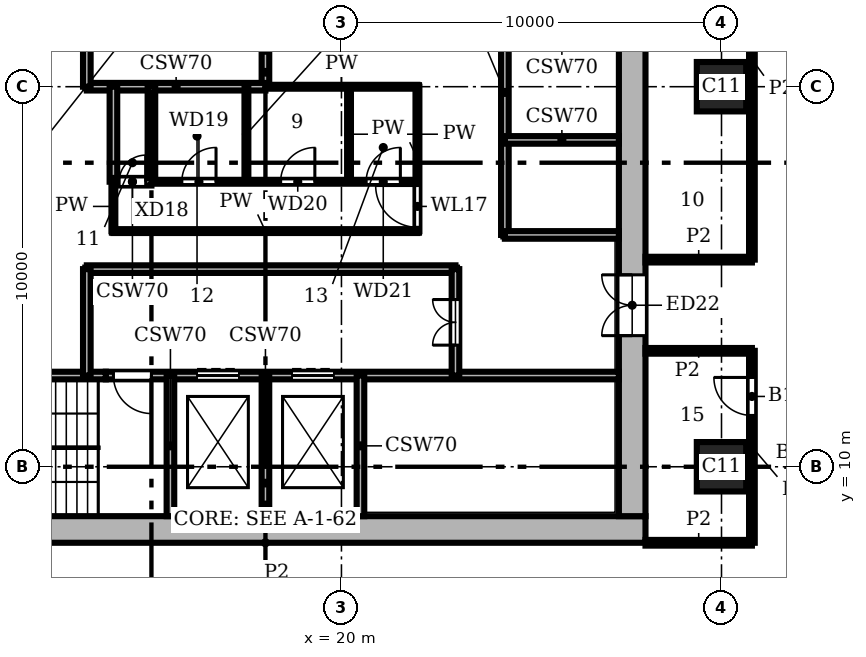
"""IFC4 building model, lengths in metres.
Left out: names, types, materials, properties, quantities, classifications, styles, units other than length and angle.
Written with IfcOpenShell. Run it as: python <this file> out.ifc"""

import sys

from ifc_helpers import new_model, si_unit, direction, frame, frame_2d, origin, origin_2d, place, context, subcontext, project, spatial, rectangle, extrude, element, fill, save


model = new_model("IFC4")
c1 = context("Model", 3, precision=1e-05, world=origin(), true_north=direction((0.0, 1.0)))
c2 = subcontext(c1, "Body", "Model", "MODEL_VIEW")
j1 = project(units=[si_unit("LENGTHUNIT", "METRE"), si_unit("PLANEANGLEUNIT", "RADIAN")], contexts=[c1])
p1 = place(None, origin())
s1 = spatial("IfcSite", under=j1, at=p1, CompositionType="ELEMENT")
p2 = place(p1, origin())
s2 = spatial("IfcBuilding", under=s1, at=p2, CompositionType="ELEMENT")
p3 = place(p2, frame((0.0, 0.0, 131.7)))
s3 = spatial("IfcBuildingStorey", under=s2, at=p3, CompositionType="ELEMENT", Elevation=131.7)
for number, where, z_axis, x_axis in (
    (1, (30.0, 10.0, 0.0), (0.0, 0.0, 1.0), (1.0, 0.0, 0.0)),
    (2, (30.0, 20.0, 0.0), (0.0, 0.0, 1.0), (1.0, 0.0, 0.0)),
):
    element("IfcColumn", number, at=place(p3, frame(where, z_axis=z_axis, x_axis=x_axis)), inside=s3, PredefinedType="COLUMN", context=c2, shape_type="SweptSolid", body=[
        extrude(rectangle(XDim=1.3, YDim=1.3, at=origin_2d()), origin(), (0.0, 0.0, 1.0), 3.9),
    ])
p4 = place(p3, frame((8.0, 8.35, 0.0), z_axis=(0.0, 0.0, 1.0), x_axis=(1.0, 0.0, 0.0)))
e3 = element("IfcWall", 3, at=p4, inside=s3, PredefinedType="SHEAR", context=c2, shape_type="SweptSolid", body=[
    extrude(rectangle(XDim=20.0, YDim=0.7, at=frame_2d((10.0, 0.0))), origin(), (0.0, 0.0, 1.0), 3.9),
])
p5 = place(p3, frame((27.65, 8.7, 0.0), z_axis=(0.0, 0.0, 1.0), x_axis=(0.0, 1.0, 0.0)))
e4 = element("IfcWall", 4, at=p5, inside=s3, PredefinedType="SHEAR", context=c2, shape_type="SweptSolid", body=[
    extrude(rectangle(XDim=18.6, YDim=0.7, at=frame_2d((9.3, 0.0))), origin(), (0.0, 0.0, 1.0), 3.9),
])
p6 = place(p5, frame((4.75, 0.0, 0.0)))
e5 = element("IfcOpeningElement", 5, at=p6, cuts=e4, PredefinedType="OPENING", context=c2, shape_type="SweptSolid", body=[
    extrude(rectangle(XDim=1.6, YDim=2.1, at=frame_2d((0.8, 1.05))), frame((0.0, 0.36, 0.0), z_axis=(0.0, -1.0, 0.0), x_axis=(1.0, 0.0, 0.0)), (0.0, 0.0, 1.0), 0.72),
])
p7 = place(p3, frame((8.7, 12.4, 0.0), z_axis=(0.0, 0.0, 1.0), x_axis=(1.0, 0.0, 0.0)))
e6 = element("IfcWall", 6, at=p7, inside=s3, PredefinedType="SHEAR", context=c2, shape_type="SweptSolid", body=[
    extrude(rectangle(XDim=5.1, YDim=0.2, at=frame_2d((2.55, 0.0))), origin(), (0.0, 0.0, 1.0), 3.58),
])
p8 = place(p3, frame((13.8, 12.4, 0.0), z_axis=(0.0, 0.0, 1.0), x_axis=(1.0, 0.0, 0.0)))
e7 = element("IfcWall", 7, at=p8, inside=s3, PredefinedType="SHEAR", context=c2, shape_type="SweptSolid", body=[
    extrude(rectangle(XDim=13.5, YDim=0.2, at=frame_2d((6.75, 0.0))), origin(), (0.0, 0.0, 1.0), 3.58),
])
p9 = place(p8, frame((2.4, 0.0, 0.0)))
e8 = element("IfcOpeningElement", 8, at=p9, cuts=e7, PredefinedType="OPENING", context=c2, shape_type="SweptSolid", body=[
    extrude(rectangle(XDim=1.1, YDim=2.1, at=frame_2d((0.55, 1.05))), frame((0.0, 0.11, 0.0), z_axis=(0.0, -1.0, 0.0), x_axis=(1.0, 0.0, 0.0)), (0.0, 0.0, 1.0), 0.22),
])
p10 = place(p8, frame((4.9, 0.0, 0.0)))
e9 = element("IfcOpeningElement", 9, at=p10, cuts=e7, PredefinedType="OPENING", context=c2, shape_type="SweptSolid", body=[
    extrude(rectangle(XDim=1.1, YDim=2.1, at=frame_2d((0.55, 1.05))), frame((0.0, 0.11, 0.0), z_axis=(0.0, -1.0, 0.0), x_axis=(1.0, 0.0, 0.0)), (0.0, 0.0, 1.0), 0.22),
])
p11 = place(p8, frame((0.2, 0.0, 0.0)))
e10 = element("IfcOpeningElement", 10, at=p11, cuts=e7, PredefinedType="OPENING", context=c2, shape_type="SweptSolid", body=[
    extrude(rectangle(XDim=1.0, YDim=2.1, at=frame_2d((0.5, 1.05))), frame((0.0, 0.11, 0.0), z_axis=(0.0, -1.0, 0.0), x_axis=(1.0, 0.0, 0.0)), (0.0, 0.0, 1.0), 0.22),
])
p12 = place(p3, frame((13.3, 15.2, 0.0), z_axis=(0.0, 0.0, 1.0), x_axis=(1.0, 0.0, 0.0)))
e11 = element("IfcWall", 11, at=p12, inside=s3, PredefinedType="SHEAR", context=c2, shape_type="SweptSolid", body=[
    extrude(rectangle(XDim=9.7, YDim=0.2, at=frame_2d((4.85, 0.0))), origin(), (0.0, 0.0, 1.0), 3.58),
])
p13 = place(p3, frame((24.3, 16.1, 0.0), z_axis=(0.0, 0.0, 1.0), x_axis=(1.0, 0.0, 0.0)))
e12 = element("IfcWall", 12, at=p13, inside=s3, PredefinedType="SHEAR", context=c2, shape_type="SweptSolid", body=[
    extrude(rectangle(XDim=3.0, YDim=0.2, at=frame_2d((1.5, 0.0))), origin(), (0.0, 0.0, 1.0), 3.58),
])
p14 = place(p3, frame((14.0, 16.2, 0.0), z_axis=(0.0, 0.0, 1.0), x_axis=(1.0, 0.0, 0.0)))
e13 = element("IfcWall", 13, at=p14, inside=s3, PredefinedType="PARTITIONING", context=c2, shape_type="SweptSolid", body=[
    extrude(rectangle(XDim=8.0, YDim=0.1, at=frame_2d((4.0, 0.0))), origin(), (0.0, 0.0, 1.0), 3.58),
])
p15 = place(p3, frame((15.0, 17.5, 0.0), z_axis=(0.0, 0.0, 1.0), x_axis=(1.0, 0.0, 0.0)))
e14 = element("IfcWall", 14, at=p15, inside=s3, PredefinedType="PARTITIONING", context=c2, shape_type="SweptSolid", body=[
    extrude(rectangle(XDim=7.0, YDim=0.1, at=frame_2d((3.5, 0.0))), origin(), (0.0, 0.0, 1.0), 3.58),
])
p16 = place(p15, frame((0.8, 0.0, 0.0)))
e15 = element("IfcOpeningElement", 15, at=p16, cuts=e14, PredefinedType="OPENING", context=c2, shape_type="SweptSolid", body=[
    extrude(rectangle(XDim=0.9, YDim=2.1, at=frame_2d((0.45, 1.05))), frame((0.0, 0.06, 0.0), z_axis=(0.0, -1.0, 0.0), x_axis=(1.0, 0.0, 0.0)), (0.0, 0.0, 1.0), 0.12),
])
p17 = place(p15, frame((3.4, 0.0, 0.0)))
e16 = element("IfcOpeningElement", 16, at=p17, cuts=e14, PredefinedType="OPENING", context=c2, shape_type="SweptSolid", body=[
    extrude(rectangle(XDim=0.9, YDim=2.1, at=frame_2d((0.45, 1.05))), frame((0.0, 0.06, 0.0), z_axis=(0.0, -1.0, 0.0), x_axis=(1.0, 0.0, 0.0)), (0.0, 0.0, 1.0), 0.12),
])
p18 = place(p15, frame((5.65, 0.0, 0.0)))
e17 = element("IfcOpeningElement", 17, at=p18, cuts=e14, PredefinedType="OPENING", context=c2, shape_type="SweptSolid", body=[
    extrude(rectangle(XDim=0.9, YDim=2.1, at=frame_2d((0.45, 1.05))), frame((0.0, 0.06, 0.0), z_axis=(0.0, -1.0, 0.0), x_axis=(1.0, 0.0, 0.0)), (0.0, 0.0, 1.0), 0.12),
])
p19 = place(p3, frame((14.0, 17.5, 0.0), z_axis=(0.0, 0.0, 1.0), x_axis=(1.0, 0.0, 0.0)))
e18 = element("IfcWall", 18, at=p19, inside=s3, PredefinedType="SHEAR", context=c2, shape_type="SweptSolid", body=[
    extrude(rectangle(XDim=1.0, YDim=0.2, at=frame_2d((0.5, 0.0))), origin(), (0.0, 0.0, 1.0), 3.58),
])
p20 = place(p19, frame((0.15, 0.0, 0.0)))
e19 = element("IfcOpeningElement", 19, at=p20, cuts=e18, PredefinedType="OPENING", context=c2, shape_type="SweptSolid", body=[
    extrude(rectangle(XDim=0.7, YDim=2.1, at=frame_2d((0.35, 1.05))), frame((0.0, 0.11, 0.0), z_axis=(0.0, -1.0, 0.0), x_axis=(1.0, 0.0, 0.0)), (0.0, 0.0, 1.0), 0.22),
])
p21 = place(p3, frame((24.3, 18.6, 0.0), z_axis=(0.0, 0.0, 1.0), x_axis=(1.0, 0.0, 0.0)))
e20 = element("IfcWall", 20, at=p21, inside=s3, PredefinedType="SHEAR", context=c2, shape_type="SweptSolid", body=[
    extrude(rectangle(XDim=3.0, YDim=0.2, at=frame_2d((1.5, 0.0))), origin(), (0.0, 0.0, 1.0), 3.58),
])
p22 = place(p3, frame((18.0, 20.0, 0.0), z_axis=(0.0, 0.0, 1.0), x_axis=(1.0, 0.0, 0.0)))
e21 = element("IfcWall", 21, at=p22, inside=s3, PredefinedType="PARTITIONING", context=c2, shape_type="SweptSolid", body=[
    extrude(rectangle(XDim=4.0, YDim=0.1, at=frame_2d((2.0, 0.0))), origin(), (0.0, 0.0, 1.0), 3.58),
])
p23 = place(p3, frame((13.3, 20.0, 0.0), z_axis=(0.0, 0.0, 1.0), x_axis=(1.0, 0.0, 0.0)))
e22 = element("IfcWall", 22, at=p23, inside=s3, PredefinedType="SHEAR", context=c2, shape_type="SweptSolid", body=[
    extrude(rectangle(XDim=4.7, YDim=0.2, at=frame_2d((2.35, 0.0))), origin(), (0.0, 0.0, 1.0), 3.58),
])
p24 = place(p3, frame((13.3, 12.4, 0.0), z_axis=(0.0, 0.0, 1.0), x_axis=(0.0, 1.0, 0.0)))
e23 = element("IfcWall", 23, at=p24, inside=s3, PredefinedType="SHEAR", context=c2, shape_type="SweptSolid", body=[
    extrude(rectangle(XDim=2.8, YDim=0.2, at=frame_2d((1.4, 0.0))), origin(), (0.0, 0.0, 1.0), 3.58),
])
p25 = place(p3, frame((13.3, 20.0, 0.0), z_axis=(0.0, 0.0, 1.0), x_axis=(0.0, 1.0, 0.0)))
e24 = element("IfcWall", 24, at=p25, inside=s3, PredefinedType="SHEAR", context=c2, shape_type="SweptSolid", body=[
    extrude(rectangle(XDim=3.6, YDim=0.2, at=frame_2d((1.8, 0.0))), origin(), (0.0, 0.0, 1.0), 3.58),
])
p26 = place(p3, frame((14.0, 16.2, 0.0), z_axis=(0.0, 0.0, 1.0), x_axis=(0.0, 1.0, 0.0)))
e25 = element("IfcWall", 25, at=p26, inside=s3, PredefinedType="PARTITIONING", context=c2, shape_type="SweptSolid", body=[
    extrude(rectangle(XDim=1.3, YDim=0.1, at=frame_2d((0.65, 0.0))), origin(), (0.0, 0.0, 1.0), 3.58),
])
for number, where, z_axis, x_axis in (
    (26, (14.0, 17.5, 0.0), (0.0, 0.0, 1.0), (0.0, 1.0, 0.0)),
    (27, (15.0, 17.5, 0.0), (0.0, 0.0, 1.0), (0.0, 1.0, 0.0)),
):
    element("IfcWall", number, at=place(p3, frame(where, z_axis=z_axis, x_axis=x_axis)), inside=s3, PredefinedType="SHEAR", context=c2, shape_type="SweptSolid", body=[
        extrude(rectangle(XDim=2.5, YDim=0.2, at=frame_2d((1.25, 0.0))), origin(), (0.0, 0.0, 1.0), 3.58),
    ])
p27 = place(p3, frame((15.5, 8.7, 0.0), z_axis=(0.0, 0.0, 1.0), x_axis=(0.0, 1.0, 0.0)))
e28 = element("IfcWall", 28, at=p27, inside=s3, PredefinedType="SHEAR", context=c2, shape_type="SweptSolid", body=[
    extrude(rectangle(XDim=3.7, YDim=0.2, at=frame_2d((1.85, 0.0))), origin(), (0.0, 0.0, 1.0), 3.58),
])
p28 = place(p3, frame((17.5, 17.5, 0.0), z_axis=(0.0, 0.0, 1.0), x_axis=(0.0, 1.0, 0.0)))
e29 = element("IfcWall", 29, at=p28, inside=s3, PredefinedType="PARTITIONING", context=c2, shape_type="SweptSolid", body=[
    extrude(rectangle(XDim=2.5, YDim=0.1, at=frame_2d((1.25, 0.0))), origin(), (0.0, 0.0, 1.0), 3.58),
])
p29 = place(p3, frame((18.0, 8.7, 0.0), z_axis=(0.0, 0.0, 1.0), x_axis=(0.0, 1.0, 0.0)))
e30 = element("IfcWall", 30, at=p29, inside=s3, PredefinedType="SHEAR", context=c2, shape_type="SweptSolid", body=[
    extrude(rectangle(XDim=3.7, YDim=0.2, at=frame_2d((1.85, 0.0))), origin(), (0.0, 0.0, 1.0), 3.58),
])
p30 = place(p3, frame((18.0, 20.0, 0.0), z_axis=(0.0, 0.0, 1.0), x_axis=(0.0, 1.0, 0.0)))
e31 = element("IfcWall", 31, at=p30, inside=s3, PredefinedType="SHEAR", context=c2, shape_type="SweptSolid", body=[
    extrude(rectangle(XDim=7.3, YDim=0.2, at=frame_2d((3.65, 0.0))), origin(), (0.0, 0.0, 1.0), 3.58),
])
p31 = place(p30, frame((1.2, 0.0, 0.0)))
e32 = element("IfcOpeningElement", 32, at=p31, cuts=e31, PredefinedType="OPENING", context=c2, shape_type="SweptSolid", body=[
    extrude(rectangle(XDim=1.2, YDim=2.1, at=frame_2d((0.6, 1.05))), frame((0.0, 0.11, 0.0), z_axis=(0.0, -1.0, 0.0), x_axis=(1.0, 0.0, 0.0)), (0.0, 0.0, 1.0), 0.22),
])
p32 = place(p3, frame((20.2, 17.5, 0.0), z_axis=(0.0, 0.0, 1.0), x_axis=(0.0, 1.0, 0.0)))
e33 = element("IfcWall", 33, at=p32, inside=s3, PredefinedType="PARTITIONING", context=c2, shape_type="SweptSolid", body=[
    extrude(rectangle(XDim=2.5, YDim=0.1, at=frame_2d((1.25, 0.0))), origin(), (0.0, 0.0, 1.0), 3.58),
])
p33 = place(p3, frame((20.5, 8.7, 0.0), z_axis=(0.0, 0.0, 1.0), x_axis=(0.0, 1.0, 0.0)))
e34 = element("IfcWall", 34, at=p33, inside=s3, PredefinedType="SHEAR", context=c2, shape_type="SweptSolid", body=[
    extrude(rectangle(XDim=3.7, YDim=0.2, at=frame_2d((1.85, 0.0))), origin(), (0.0, 0.0, 1.0), 3.58),
])
p34 = place(p3, frame((22.0, 16.2, 0.0), z_axis=(0.0, 0.0, 1.0), x_axis=(0.0, 1.0, 0.0)))
e35 = element("IfcWall", 35, at=p34, inside=s3, PredefinedType="PARTITIONING", context=c2, shape_type="SweptSolid", body=[
    extrude(rectangle(XDim=3.8, YDim=0.1, at=frame_2d((1.9, 0.0))), origin(), (0.0, 0.0, 1.0), 3.58),
])
p35 = place(p34, frame((0.1, 0.0, 0.0)))
e36 = element("IfcOpeningElement", 36, at=p35, cuts=e35, PredefinedType="OPENING", context=c2, shape_type="SweptSolid", body=[
    extrude(rectangle(XDim=1.1, YDim=2.1, at=frame_2d((0.55, 1.05))), frame((0.0, 0.06, 0.0), z_axis=(0.0, -1.0, 0.0), x_axis=(1.0, 0.0, 0.0)), (0.0, 0.0, 1.0), 0.12),
])
p36 = place(p3, frame((23.0, 12.4, 0.0), z_axis=(0.0, 0.0, 1.0), x_axis=(0.0, 1.0, 0.0)))
e37 = element("IfcWall", 37, at=p36, inside=s3, PredefinedType="SHEAR", context=c2, shape_type="SweptSolid", body=[
    extrude(rectangle(XDim=2.8, YDim=0.2, at=frame_2d((1.4, 0.0))), origin(), (0.0, 0.0, 1.0), 3.58),
])
p37 = place(p36, frame((0.8, 0.0, 0.0)))
e38 = element("IfcOpeningElement", 38, at=p37, cuts=e37, PredefinedType="OPENING", context=c2, shape_type="SweptSolid", body=[
    extrude(rectangle(XDim=1.2, YDim=2.1, at=frame_2d((0.6, 1.05))), frame((0.0, 0.11, 0.0), z_axis=(0.0, -1.0, 0.0), x_axis=(1.0, 0.0, 0.0)), (0.0, 0.0, 1.0), 0.22),
])
p38 = place(p3, frame((24.3, 16.1, 0.0), z_axis=(0.0, 0.0, 1.0), x_axis=(0.0, 1.0, 0.0)))
e39 = element("IfcWall", 39, at=p38, inside=s3, PredefinedType="SHEAR", context=c2, shape_type="SweptSolid", body=[
    extrude(rectangle(XDim=7.5, YDim=0.2, at=frame_2d((3.75, 0.0))), origin(), (0.0, 0.0, 1.0), 3.58),
])
p39 = place(p38, frame((5.7, 0.0, 0.0)))
e40 = element("IfcOpeningElement", 40, at=p39, cuts=e39, PredefinedType="OPENING", context=c2, shape_type="SweptSolid", body=[
    extrude(rectangle(XDim=1.1, YDim=2.1, at=frame_2d((0.55, 1.05))), frame((0.0, 0.11, 0.0), z_axis=(0.0, -1.0, 0.0), x_axis=(1.0, 0.0, 0.0)), (0.0, 0.0, 1.0), 0.22),
])
p40 = place(p3, frame((30.8, 8.0, 0.0), z_axis=(0.0, 0.0, 1.0), x_axis=(0.0, 1.0, 0.0)))
e41 = element("IfcWall", 41, at=p40, inside=s3, PredefinedType="PARTITIONING", context=c2, shape_type="SweptSolid", body=[
    extrude(rectangle(XDim=5.05, YDim=0.15, at=frame_2d((2.525, 0.0))), origin(), (0.0, 0.0, 1.0), 3.58),
])
p41 = place(p40, frame((3.35, 0.0, 0.0)))
e42 = element("IfcOpeningElement", 42, at=p41, cuts=e41, PredefinedType="OPENING", context=c2, shape_type="SweptSolid", body=[
    extrude(rectangle(XDim=1.0, YDim=2.1, at=frame_2d((0.5, 1.05))), frame((0.0, 0.085, 0.0), z_axis=(0.0, -1.0, 0.0), x_axis=(1.0, 0.0, 0.0)), (0.0, 0.0, 1.0), 0.17),
])
p42 = place(p3, frame((30.8, 15.45, 0.0), z_axis=(0.0, 0.0, 1.0), x_axis=(0.0, 1.0, 0.0)))
e43 = element("IfcWall", 43, at=p42, inside=s3, PredefinedType="PARTITIONING", context=c2, shape_type="SweptSolid", body=[
    extrude(rectangle(XDim=10.55, YDim=0.15, at=frame_2d((5.275, 0.0))), origin(), (0.0, 0.0, 1.0), 3.58),
])
p43 = place(p42, frame((5.6, 0.0, 0.0)))
e44 = element("IfcOpeningElement", 44, at=p43, cuts=e43, PredefinedType="OPENING", context=c2, shape_type="SweptSolid", body=[
    extrude(rectangle(XDim=1.0, YDim=2.1, at=frame_2d((0.5, 1.05))), frame((0.0, 0.085, 0.0), z_axis=(0.0, -1.0, 0.0), x_axis=(1.0, 0.0, 0.0)), (0.0, 0.0, 1.0), 0.17),
])
for number, where, z_axis, x_axis in (
    (45, (28.0, 8.0, 0.0), (0.0, 0.0, 1.0), (1.0, 0.0, 0.0)),
    (46, (28.0, 13.05, 0.0), (0.0, 0.0, 1.0), (1.0, 0.0, 0.0)),
    (47, (28.0, 15.45, 0.0), (0.0, 0.0, 1.0), (1.0, 0.0, 0.0)),
):
    element("IfcWall", number, at=place(p3, frame(where, z_axis=z_axis, x_axis=x_axis)), inside=s3, PredefinedType="PARTITIONING", context=c2, shape_type="SweptSolid", body=[
        extrude(rectangle(XDim=2.8, YDim=0.15, at=frame_2d((1.4, 0.0))), origin(), (0.0, 0.0, 1.0), 3.58),
    ])
p44 = place(p9, origin())
e48 = element("IfcDoor", 48, at=p44, inside=s3, OperationType="DOUBLE_DOOR_SLIDING", PredefinedType="DOOR", context=c2, shape_type="SweptSolid", body=[
    extrude(rectangle(XDim=1.1, YDim=2.1, at=frame_2d((0.55, 1.05))), frame((0.0, 0.025, 0.0), z_axis=(0.0, -1.0, 0.0), x_axis=(1.0, 0.0, 0.0)), (0.0, 0.0, 1.0), 0.05),
])
fill(e8, e48)
p45 = place(p10, origin())
e49 = element("IfcDoor", 49, at=p45, inside=s3, OperationType="DOUBLE_DOOR_SLIDING", PredefinedType="DOOR", context=c2, shape_type="SweptSolid", body=[
    extrude(rectangle(XDim=1.1, YDim=2.1, at=frame_2d((0.55, 1.05))), frame((0.0, 0.025, 0.0), z_axis=(0.0, -1.0, 0.0), x_axis=(1.0, 0.0, 0.0)), (0.0, 0.0, 1.0), 0.05),
])
fill(e9, e49)
p46 = place(p11, frame((1.0, 0.0, 0.0), z_axis=(0.0, 0.0, 1.0), x_axis=(-1.0, 0.0, 0.0)))
e50 = element("IfcDoor", 50, at=p46, inside=s3, OperationType="SINGLE_SWING_LEFT", PredefinedType="DOOR", context=c2, shape_type="SweptSolid", body=[
    extrude(rectangle(XDim=1.0, YDim=2.1, at=frame_2d((0.5, 1.05))), frame((0.0, 0.025, 0.0), z_axis=(0.0, -1.0, 0.0), x_axis=(1.0, 0.0, 0.0)), (0.0, 0.0, 1.0), 0.05),
])
fill(e10, e50)
p47 = place(p37, origin())
e51 = element("IfcDoor", 51, at=p47, inside=s3, OperationType="DOUBLE_DOOR_SINGLE_SWING", PredefinedType="DOOR", context=c2, shape_type="SweptSolid", body=[
    extrude(rectangle(XDim=1.2, YDim=2.1, at=frame_2d((0.6, 1.05))), frame((0.0, 0.025, 0.0), z_axis=(0.0, -1.0, 0.0), x_axis=(1.0, 0.0, 0.0)), (0.0, 0.0, 1.0), 0.05),
])
fill(e38, e51)
p48 = place(p35, origin())
e52 = element("IfcDoor", 52, at=p48, inside=s3, OperationType="SINGLE_SWING_RIGHT", PredefinedType="DOOR", context=c2, shape_type="SweptSolid", body=[
    extrude(rectangle(XDim=1.1, YDim=2.1, at=frame_2d((0.55, 1.05))), frame((0.0, 0.025, 0.0), z_axis=(0.0, -1.0, 0.0), x_axis=(1.0, 0.0, 0.0)), (0.0, 0.0, 1.0), 0.05),
])
fill(e36, e52)
p49 = place(p20, origin())
e53 = element("IfcDoor", 53, at=p49, inside=s3, OperationType="SINGLE_SWING_RIGHT", PredefinedType="DOOR", context=c2, shape_type="SweptSolid", body=[
    extrude(rectangle(XDim=0.7, YDim=2.1, at=frame_2d((0.35, 1.05))), frame((0.0, 0.025, 0.0), z_axis=(0.0, -1.0, 0.0), x_axis=(1.0, 0.0, 0.0)), (0.0, 0.0, 1.0), 0.05),
])
fill(e19, e53)
p50 = place(p16, origin())
e54 = element("IfcDoor", 54, at=p50, inside=s3, OperationType="SINGLE_SWING_RIGHT", PredefinedType="DOOR", context=c2, shape_type="SweptSolid", body=[
    extrude(rectangle(XDim=0.9, YDim=2.1, at=frame_2d((0.45, 1.05))), frame((0.0, 0.025, 0.0), z_axis=(0.0, -1.0, 0.0), x_axis=(1.0, 0.0, 0.0)), (0.0, 0.0, 1.0), 0.05),
])
fill(e15, e54)
p51 = place(p17, origin())
e55 = element("IfcDoor", 55, at=p51, inside=s3, OperationType="SINGLE_SWING_RIGHT", PredefinedType="DOOR", context=c2, shape_type="SweptSolid", body=[
    extrude(rectangle(XDim=0.9, YDim=2.1, at=frame_2d((0.45, 1.05))), frame((0.0, 0.025, 0.0), z_axis=(0.0, -1.0, 0.0), x_axis=(1.0, 0.0, 0.0)), (0.0, 0.0, 1.0), 0.05),
])
fill(e16, e55)
p52 = place(p18, origin())
e56 = element("IfcDoor", 56, at=p52, inside=s3, OperationType="SINGLE_SWING_RIGHT", PredefinedType="DOOR", context=c2, shape_type="SweptSolid", body=[
    extrude(rectangle(XDim=0.9, YDim=2.1, at=frame_2d((0.45, 1.05))), frame((0.0, 0.025, 0.0), z_axis=(0.0, -1.0, 0.0), x_axis=(1.0, 0.0, 0.0)), (0.0, 0.0, 1.0), 0.05),
])
fill(e17, e56)
p53 = place(p6, origin())
e57 = element("IfcDoor", 57, at=p53, inside=s3, OperationType="DOUBLE_DOOR_SINGLE_SWING", PredefinedType="DOOR", context=c2, shape_type="SweptSolid", body=[
    extrude(rectangle(XDim=1.6, YDim=2.1, at=frame_2d((0.8, 1.05))), frame((0.0, 0.025, 0.0), z_axis=(0.0, -1.0, 0.0), x_axis=(1.0, 0.0, 0.0)), (0.0, 0.0, 1.0), 0.05),
])
fill(e5, e57)
p54 = place(p41, origin())
e58 = element("IfcDoor", 58, at=p54, inside=s3, OperationType="SINGLE_SWING_RIGHT", PredefinedType="DOOR", context=c2, shape_type="SweptSolid", body=[
    extrude(rectangle(XDim=1.0, YDim=2.1, at=frame_2d((0.5, 1.05))), frame((0.0, 0.025, 0.0), z_axis=(0.0, -1.0, 0.0), x_axis=(1.0, 0.0, 0.0)), (0.0, 0.0, 1.0), 0.05),
])
fill(e42, e58)
save(model, sys.argv[1])
